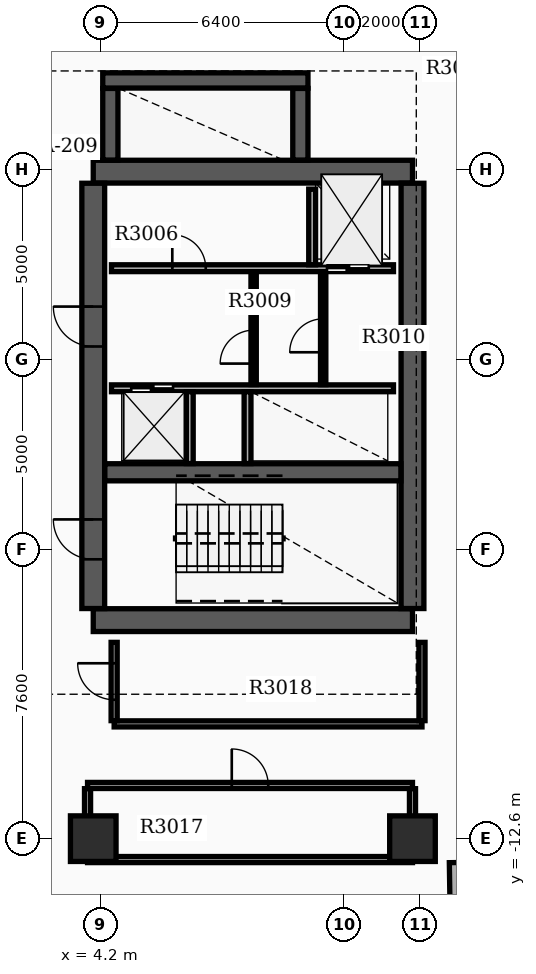
"""IFC4 building model, lengths in metres.
Left out: names, types, materials, properties, quantities, classifications, styles, units other than length and angle.
Written with IfcOpenShell. Run it as: python <this file> out.ifc"""

import sys

from ifc_helpers import new_model, si_unit, direction, frame, frame_2d, origin, origin_2d, place, context, subcontext, project, spatial, rectangle, extrude, element, fill, save


model = new_model("IFC4")
c1 = context("Model", 3, precision=1e-05, world=origin(), true_north=direction((0.0, 1.0)))
c2 = subcontext(c1, "Body", "Model", "MODEL_VIEW")
j1 = project(units=[si_unit("LENGTHUNIT", "METRE"), si_unit("PLANEANGLEUNIT", "RADIAN")], contexts=[c1])
p1 = place(None, origin())
s1 = spatial("IfcSite", under=j1, at=p1, CompositionType="ELEMENT")
p2 = place(p1, origin())
s2 = spatial("IfcBuilding", under=s1, at=p2, CompositionType="ELEMENT")
p3 = place(p2, frame((0.0, 0.0, 187.8)))
s3 = spatial("IfcBuildingStorey", under=s2, at=p3, CompositionType="ELEMENT", Elevation=187.8)
for number, where, z_axis, x_axis in (
    (1, (4.0, -6.85, 0.0), (0.0, 0.0, 1.0), (1.0, 0.0, 0.0)),
    (2, (4.0, 4.95, 0.0), (0.0, 0.0, 1.0), (1.0, 0.0, 0.0)),
):
    element("IfcWall", number, at=place(p3, frame(where, z_axis=z_axis, x_axis=x_axis)), inside=s3, PredefinedType="SHEAR", context=c2, shape_type="SweptSolid", body=[
        extrude(rectangle(XDim=8.4, YDim=0.6, at=frame_2d((4.2, 0.0))), origin(), (0.0, 0.0, 1.0), 3.65),
    ])
p4 = place(p3, frame((4.0, -6.545, 0.0), z_axis=(0.0, 0.0, 1.0), x_axis=(0.0, 1.0, 0.0)))
e3 = element("IfcWall", 3, at=p4, inside=s3, PredefinedType="SHEAR", context=c2, shape_type="SweptSolid", body=[
    extrude(rectangle(XDim=11.19, YDim=0.6, at=frame_2d((5.595, 0.0))), origin(), (0.0, 0.0, 1.0), 3.65),
])
p5 = place(p4, frame((1.295, 0.0, 0.0)))
e4 = element("IfcOpeningElement", 4, at=p5, cuts=e3, PredefinedType="OPENING", context=c2, shape_type="SweptSolid", body=[
    extrude(rectangle(XDim=1.05, YDim=2.15, at=frame_2d((0.525, 1.075))), frame((0.0, 0.31, 0.0), z_axis=(0.0, -1.0, 0.0), x_axis=(1.0, 0.0, 0.0)), (0.0, 0.0, 1.0), 0.62),
])
p6 = place(p4, frame((6.895, 0.0, 0.0)))
e5 = element("IfcOpeningElement", 5, at=p6, cuts=e3, PredefinedType="OPENING", context=c2, shape_type="SweptSolid", body=[
    extrude(rectangle(XDim=1.05, YDim=2.15, at=frame_2d((0.525, 1.075))), frame((0.0, 0.31, 0.0), z_axis=(0.0, -1.0, 0.0), x_axis=(1.0, 0.0, 0.0)), (0.0, 0.0, 1.0), 0.62),
])
p7 = place(p3, frame((12.4, -6.545, 0.0), z_axis=(0.0, 0.0, 1.0), x_axis=(0.0, 1.0, 0.0)))
e6 = element("IfcWall", 6, at=p7, inside=s3, PredefinedType="SHEAR", context=c2, shape_type="SweptSolid", body=[
    extrude(rectangle(XDim=11.19, YDim=0.6, at=frame_2d((5.595, 0.0))), origin(), (0.0, 0.0, 1.0), 3.65),
])
p8 = place(p3, frame((4.305, -2.96, 0.0), z_axis=(0.0, 0.0, 1.0), x_axis=(1.0, 0.0, 0.0)))
e7 = element("IfcWall", 7, at=p8, inside=s3, PredefinedType="SHEAR", context=c2, shape_type="SweptSolid", body=[
    extrude(rectangle(XDim=7.79, YDim=0.45, at=frame_2d((3.895, 0.0))), origin(), (0.0, 0.0, 1.0), 3.65),
])
p9 = place(p3, frame((4.45, 5.255, 0.0), z_axis=(0.0, 0.0, 1.0), x_axis=(0.0, 1.0, 0.0)))
e8 = element("IfcWall", 8, at=p9, inside=s3, PredefinedType="SHEAR", context=c2, shape_type="SweptSolid", body=[
    extrude(rectangle(XDim=1.885, YDim=0.4, at=frame_2d((0.942, 0.0))), origin(), (0.0, 0.0, 1.0), 3.65),
])
p10 = place(p3, frame((4.25, 7.35, 0.0), z_axis=(0.0, 0.0, 1.0), x_axis=(1.0, 0.0, 0.0)))
e9 = element("IfcWall", 9, at=p10, inside=s3, PredefinedType="SHEAR", context=c2, shape_type="SweptSolid", body=[
    extrude(rectangle(XDim=5.4, YDim=0.4, at=frame_2d((2.7, 0.0))), origin(), (0.0, 0.0, 1.0), 3.65),
])
p11 = place(p3, frame((9.45, 5.255, 0.0), z_axis=(0.0, 0.0, 1.0), x_axis=(0.0, 1.0, 0.0)))
e10 = element("IfcWall", 10, at=p11, inside=s3, PredefinedType="SHEAR", context=c2, shape_type="SweptSolid", body=[
    extrude(rectangle(XDim=1.885, YDim=0.4, at=frame_2d((0.942, 0.0))), origin(), (0.0, 0.0, 1.0), 3.65),
])
for number, where, z_axis, x_axis in (
    (11, (12.4, -12.6, 0.0), (0.0, 0.0, 1.0), (1.0, 0.0, 0.0)),
    (12, (4.0, -12.6, 0.0), (0.0, 0.0, 1.0), (1.0, 0.0, 0.0)),
):
    element("IfcColumn", number, at=place(p3, frame(where, z_axis=z_axis, x_axis=x_axis)), inside=s3, PredefinedType="COLUMN", context=c2, shape_type="SweptSolid", body=[
        extrude(rectangle(XDim=1.2, YDim=1.2, at=origin_2d()), origin(), (0.0, 0.0, 1.0), 3.9),
    ])
p12 = place(p3, frame((13.51, -13.229, 0.0), z_axis=(0.0, 0.0, 1.0), x_axis=(0.015625635615, -0.999877912303, 0.0)))
e13 = element("IfcWall", 13, at=p12, inside=s3, PredefinedType="STANDARD", context=c2, shape_type="SweptSolid", body=[
    extrude(rectangle(XDim=1.5, YDim=0.28, at=frame_2d((0.75, 0.0))), origin(), (0.0, 0.0, 1.0), 2.92),
])
p13 = place(p3, frame((4.48, 2.41, 0.0), z_axis=(0.0, 0.0, 1.0), x_axis=(1.0, 0.0, 0.0)))
e14 = element("IfcWall", 14, at=p13, inside=s3, PredefinedType="SOLIDWALL", context=c2, shape_type="SweptSolid", body=[
    extrude(rectangle(XDim=7.42, YDim=0.18, at=frame_2d((3.71, 0.0))), origin(), (0.0, 0.0, 1.0), 2.91),
])
p14 = place(p13, frame((5.67, 0.0, 0.0)))
e15 = element("IfcOpeningElement", 15, at=p14, cuts=e14, PredefinedType="OPENING", context=c2, shape_type="SweptSolid", body=[
    extrude(rectangle(XDim=1.1, YDim=2.15, at=frame_2d((0.55, 1.075))), frame((0.0, 0.1, 0.0), z_axis=(0.0, -1.0, 0.0), x_axis=(1.0, 0.0, 0.0)), (0.0, 0.0, 1.0), 0.2),
])
p15 = place(p13, frame((1.6, 0.0, 0.0)))
e16 = element("IfcOpeningElement", 16, at=p15, cuts=e14, PredefinedType="OPENING", context=c2, shape_type="SweptSolid", body=[
    extrude(rectangle(XDim=0.88, YDim=2.1, at=frame_2d((0.44, 1.05))), frame((0.0, 0.1, 0.0), z_axis=(0.0, -1.0, 0.0), x_axis=(1.0, 0.0, 0.0)), (0.0, 0.0, 1.0), 0.2),
])
p16 = place(p3, frame((4.48, -0.75, 0.0), z_axis=(0.0, 0.0, 1.0), x_axis=(1.0, 0.0, 0.0)))
e17 = element("IfcWall", 17, at=p16, inside=s3, PredefinedType="SOLIDWALL", context=c2, shape_type="SweptSolid", body=[
    extrude(rectangle(XDim=7.42, YDim=0.18, at=frame_2d((3.71, 0.0))), origin(), (0.0, 0.0, 1.0), 2.91),
])
p17 = place(p16, frame((0.52, 0.0, 0.0)))
e18 = element("IfcOpeningElement", 18, at=p17, cuts=e17, PredefinedType="OPENING", context=c2, shape_type="SweptSolid", body=[
    extrude(rectangle(XDim=1.1, YDim=2.15, at=frame_2d((0.55, 1.075))), frame((0.0, 0.1, 0.0), z_axis=(0.0, -1.0, 0.0), x_axis=(1.0, 0.0, 0.0)), (0.0, 0.0, 1.0), 0.2),
])
p18 = place(p3, frame((9.76, 2.5, 0.0), z_axis=(0.0, 0.0, 1.0), x_axis=(0.0, 1.0, 0.0)))
e19 = element("IfcWall", 19, at=p18, inside=s3, PredefinedType="SOLIDWALL", context=c2, shape_type="SweptSolid", body=[
    extrude(rectangle(XDim=1.99, YDim=0.18, at=frame_2d((0.995, 0.0))), origin(), (0.0, 0.0, 1.0), 2.91),
])
for number, where, z_axis, x_axis in (
    (20, (6.54, -2.73, 0.0), (0.0, 0.0, 1.0), (0.0, 1.0, 0.0)),
    (21, (8.06, -2.73, 0.0), (0.0, 0.0, 1.0), (0.0, 1.0, 0.0)),
):
    element("IfcWall", number, at=place(p3, frame(where, z_axis=z_axis, x_axis=x_axis)), inside=s3, PredefinedType="SOLIDWALL", context=c2, shape_type="SweptSolid", body=[
        extrude(rectangle(XDim=1.89, YDim=0.18, at=frame_2d((0.945, 0.0))), origin(), (0.0, 0.0, 1.0), 2.91),
    ])
p19 = place(p3, frame((8.22, -0.65, 0.0), z_axis=(0.0, 0.0, 1.0), x_axis=(0.0, 1.0, 0.0)))
e22 = element("IfcWall", 22, at=p19, inside=s3, PredefinedType="SOLIDWALL", context=c2, shape_type="SweptSolid", body=[
    extrude(rectangle(XDim=2.96, YDim=0.14, at=frame_2d((1.48, 0.0))), origin(), (0.0, 0.0, 1.0), 2.91),
])
p20 = place(p19, frame((0.55, 0.0, 0.0)))
e23 = element("IfcOpeningElement", 23, at=p20, cuts=e22, PredefinedType="OPENING", context=c2, shape_type="SweptSolid", body=[
    extrude(rectangle(XDim=0.88, YDim=2.1, at=frame_2d((0.44, 1.05))), frame((0.0, 0.08, 0.0), z_axis=(0.0, -1.0, 0.0), x_axis=(1.0, 0.0, 0.0)), (0.0, 0.0, 1.0), 0.16),
])
p21 = place(p3, frame((10.05, -0.652, 0.0), z_axis=(0.0, 0.0, 1.0), x_axis=(0.0, 1.0, 0.0)))
e24 = element("IfcWall", 24, at=p21, inside=s3, PredefinedType="PARTITIONING", context=c2, shape_type="SweptSolid", body=[
    extrude(rectangle(XDim=2.962, YDim=0.14, at=frame_2d((1.481, 0.0))), origin(), (0.0, 0.0, 1.0), 2.91),
])
p22 = place(p21, frame((0.85, 0.0, 0.0)))
e25 = element("IfcOpeningElement", 25, at=p22, cuts=e24, PredefinedType="OPENING", context=c2, shape_type="SweptSolid", body=[
    extrude(rectangle(XDim=0.88, YDim=2.1, at=frame_2d((0.44, 1.05))), frame((0.0, 0.08, 0.0), z_axis=(0.0, -1.0, 0.0), x_axis=(1.0, 0.0, 0.0)), (0.0, 0.0, 1.0), 0.16),
])
p23 = place(p3, frame((3.85, -13.15, 0.0), z_axis=(0.0, 0.0, 1.0), x_axis=(1.0, 0.0, 0.0)))
e26 = element("IfcWall", 26, at=p23, inside=s3, PredefinedType="PARTITIONING", context=c2, shape_type="SweptSolid", body=[
    extrude(rectangle(XDim=8.55, YDim=0.16, at=frame_2d((4.275, 0.0))), origin(), (0.0, 0.0, 1.0), 2.91),
])
p24 = place(p3, frame((3.85, -11.2, 0.0), z_axis=(0.0, 0.0, 1.0), x_axis=(1.0, 0.0, 0.0)))
e27 = element("IfcWall", 27, at=p24, inside=s3, PredefinedType="PARTITIONING", context=c2, shape_type="SweptSolid", body=[
    extrude(rectangle(XDim=8.55, YDim=0.16, at=frame_2d((4.275, 0.0))), origin(), (0.0, 0.0, 1.0), 2.91),
])
p25 = place(p24, frame((3.795, 0.0, 0.0)))
e28 = element("IfcOpeningElement", 28, at=p25, cuts=e27, PredefinedType="OPENING", context=c2, shape_type="SweptSolid", body=[
    extrude(rectangle(XDim=0.96, YDim=2.15, at=frame_2d((0.48, 1.075))), frame((0.0, 0.09, 0.0), z_axis=(0.0, -1.0, 0.0), x_axis=(1.0, 0.0, 0.0)), (0.0, 0.0, 1.0), 0.18),
])
for number, where, z_axis, x_axis in (
    (29, (3.85, -13.065, 0.0), (0.0, 0.0, 1.0), (0.0, 1.0, 0.0)),
    (30, (12.4, -13.065, 0.0), (0.0, 0.0, 1.0), (0.0, 1.0, 0.0)),
):
    element("IfcWall", number, at=place(p3, frame(where, z_axis=z_axis, x_axis=x_axis)), inside=s3, PredefinedType="PARTITIONING", context=c2, shape_type="SweptSolid", body=[
        extrude(rectangle(XDim=1.78, YDim=0.16, at=frame_2d((0.89, 0.0))), origin(), (0.0, 0.0, 1.0), 2.91),
    ])
p26 = place(p3, frame((4.55, -9.58, 0.0), z_axis=(0.0, 0.0, 1.0), x_axis=(1.0, 0.0, 0.0)))
e31 = element("IfcWall", 31, at=p26, inside=s3, PredefinedType="PARTITIONING", context=c2, shape_type="SweptSolid", body=[
    extrude(rectangle(XDim=8.1, YDim=0.16, at=frame_2d((4.05, 0.0))), origin(), (0.0, 0.0, 1.0), 2.91),
])
p27 = place(p3, frame((4.55, -9.495, 0.0), z_axis=(0.0, 0.0, 1.0), x_axis=(0.0, 1.0, 0.0)))
e32 = element("IfcWall", 32, at=p27, inside=s3, PredefinedType="PARTITIONING", context=c2, shape_type="SweptSolid", body=[
    extrude(rectangle(XDim=2.06, YDim=0.16, at=frame_2d((1.03, 0.0))), origin(), (0.0, 0.0, 1.0), 2.91),
])
p28 = place(p27, frame((0.55, 0.0, 0.0)))
e33 = element("IfcOpeningElement", 33, at=p28, cuts=e32, PredefinedType="OPENING", context=c2, shape_type="SweptSolid", body=[
    extrude(rectangle(XDim=0.96, YDim=2.15, at=frame_2d((0.48, 1.075))), frame((0.0, 0.09, 0.0), z_axis=(0.0, -1.0, 0.0), x_axis=(1.0, 0.0, 0.0)), (0.0, 0.0, 1.0), 0.18),
])
p29 = place(p3, frame((12.65, -9.495, 0.0), z_axis=(0.0, 0.0, 1.0), x_axis=(0.0, 1.0, 0.0)))
e34 = element("IfcWall", 34, at=p29, inside=s3, PredefinedType="PARTITIONING", context=c2, shape_type="SweptSolid", body=[
    extrude(rectangle(XDim=2.06, YDim=0.16, at=frame_2d((1.03, 0.0))), origin(), (0.0, 0.0, 1.0), 2.91),
])
p30 = place(p5, origin())
e35 = element("IfcDoor", 35, at=p30, inside=s3, OperationType="SINGLE_SWING_RIGHT", PredefinedType="DOOR", context=c2, shape_type="SweptSolid", body=[
    extrude(rectangle(XDim=1.05, YDim=2.15, at=frame_2d((0.525, 1.075))), frame((0.0, 0.025, 0.0), z_axis=(0.0, -1.0, 0.0), x_axis=(1.0, 0.0, 0.0)), (0.0, 0.0, 1.0), 0.05),
])
fill(e4, e35)
p31 = place(p6, origin())
e36 = element("IfcDoor", 36, at=p31, inside=s3, OperationType="SINGLE_SWING_RIGHT", PredefinedType="DOOR", context=c2, shape_type="SweptSolid", body=[
    extrude(rectangle(XDim=1.05, YDim=2.15, at=frame_2d((0.525, 1.075))), frame((0.0, 0.025, 0.0), z_axis=(0.0, -1.0, 0.0), x_axis=(1.0, 0.0, 0.0)), (0.0, 0.0, 1.0), 0.05),
])
fill(e5, e36)
p32 = place(p14, origin())
e37 = element("IfcDoor", 37, at=p32, inside=s3, OperationType="DOUBLE_DOOR_SLIDING", PredefinedType="DOOR", context=c2, shape_type="SweptSolid", body=[
    extrude(rectangle(XDim=1.1, YDim=2.15, at=frame_2d((0.55, 1.075))), frame((0.0, 0.025, 0.0), z_axis=(0.0, -1.0, 0.0), x_axis=(1.0, 0.0, 0.0)), (0.0, 0.0, 1.0), 0.05),
])
fill(e15, e37)
p33 = place(p17, origin())
e38 = element("IfcDoor", 38, at=p33, inside=s3, OperationType="DOUBLE_DOOR_SLIDING", PredefinedType="DOOR", context=c2, shape_type="SweptSolid", body=[
    extrude(rectangle(XDim=1.1, YDim=2.15, at=frame_2d((0.55, 1.075))), frame((0.0, 0.025, 0.0), z_axis=(0.0, -1.0, 0.0), x_axis=(1.0, 0.0, 0.0)), (0.0, 0.0, 1.0), 0.05),
])
fill(e18, e38)
p34 = place(p15, origin())
e39 = element("IfcDoor", 39, at=p34, inside=s3, OperationType="SINGLE_SWING_LEFT", PredefinedType="DOOR", context=c2, shape_type="SweptSolid", body=[
    extrude(rectangle(XDim=0.88, YDim=2.1, at=frame_2d((0.44, 1.05))), frame((0.0, 0.025, 0.0), z_axis=(0.0, -1.0, 0.0), x_axis=(1.0, 0.0, 0.0)), (0.0, 0.0, 1.0), 0.05),
])
fill(e16, e39)
p35 = place(p20, origin())
e40 = element("IfcDoor", 40, at=p35, inside=s3, OperationType="SINGLE_SWING_LEFT", PredefinedType="DOOR", context=c2, shape_type="SweptSolid", body=[
    extrude(rectangle(XDim=0.88, YDim=2.1, at=frame_2d((0.44, 1.05))), frame((0.0, 0.025, 0.0), z_axis=(0.0, -1.0, 0.0), x_axis=(1.0, 0.0, 0.0)), (0.0, 0.0, 1.0), 0.05),
])
fill(e23, e40)
p36 = place(p22, origin())
e41 = element("IfcDoor", 41, at=p36, inside=s3, OperationType="SINGLE_SWING_LEFT", PredefinedType="DOOR", context=c2, shape_type="SweptSolid", body=[
    extrude(rectangle(XDim=0.88, YDim=2.1, at=frame_2d((0.44, 1.05))), frame((0.0, 0.025, 0.0), z_axis=(0.0, -1.0, 0.0), x_axis=(1.0, 0.0, 0.0)), (0.0, 0.0, 1.0), 0.05),
])
fill(e25, e41)
p37 = place(p25, origin())
e42 = element("IfcDoor", 42, at=p37, inside=s3, OperationType="SINGLE_SWING_LEFT", PredefinedType="DOOR", context=c2, shape_type="SweptSolid", body=[
    extrude(rectangle(XDim=0.96, YDim=2.15, at=frame_2d((0.48, 1.075))), frame((0.0, 0.025, 0.0), z_axis=(0.0, -1.0, 0.0), x_axis=(1.0, 0.0, 0.0)), (0.0, 0.0, 1.0), 0.05),
])
fill(e28, e42)
p38 = place(p28, origin())
e43 = element("IfcDoor", 43, at=p38, inside=s3, OperationType="SINGLE_SWING_RIGHT", PredefinedType="DOOR", context=c2, shape_type="SweptSolid", body=[
    extrude(rectangle(XDim=0.96, YDim=2.15, at=frame_2d((0.48, 1.075))), frame((0.0, 0.025, 0.0), z_axis=(0.0, -1.0, 0.0), x_axis=(1.0, 0.0, 0.0)), (0.0, 0.0, 1.0), 0.05),
])
fill(e33, e43)
save(model, sys.argv[1])
